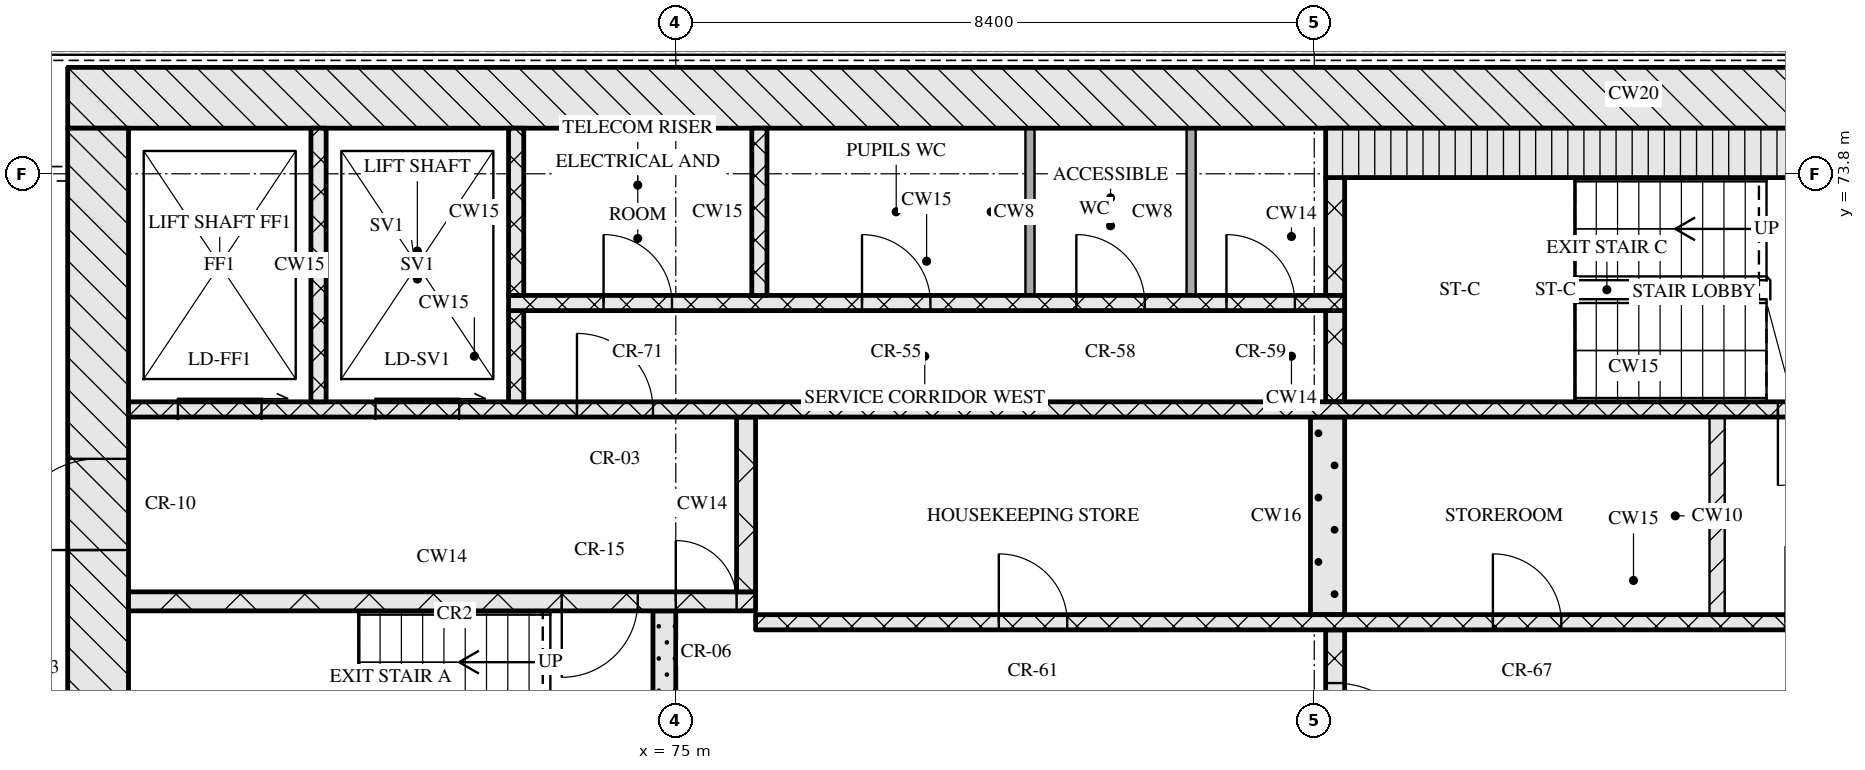
"""IFC4 building model, lengths in metres.
Left out: names, types, materials, properties, quantities, classifications, styles, units other than length and angle.
Written with IfcOpenShell. Run it as: python <this file> out.ifc"""

import sys

from ifc_helpers import new_model, si_unit, direction, frame, frame_2d, origin, place, context, subcontext, project, spatial, rectangle, extrude, element, fill, save


model = new_model("IFC4")
c1 = context("Model", 3, precision=1e-05, world=origin(), true_north=direction((0.0, 1.0)))
c2 = subcontext(c1, "Body", "Model", "MODEL_VIEW")
j1 = project(units=[si_unit("LENGTHUNIT", "METRE"), si_unit("PLANEANGLEUNIT", "RADIAN")], contexts=[c1])
p1 = place(None, origin())
s1 = spatial("IfcSite", under=j1, at=p1, CompositionType="ELEMENT")
p2 = place(p1, origin())
s2 = spatial("IfcBuilding", under=s1, at=p2, CompositionType="ELEMENT")
p3 = place(p2, frame((0.0, 0.0, 161.85)))
s3 = spatial("IfcBuildingStorey", under=s2, at=p3, CompositionType="ELEMENT", Elevation=161.85)
p4 = place(p3, frame((67.0, 74.8, 0.0), z_axis=(0.0, 0.0, 1.0), x_axis=(1.0, 0.0, 0.0)))
e1 = element("IfcWall", 1, at=p4, inside=s3, PredefinedType="SOLIDWALL", context=c2, shape_type="SweptSolid", body=[
    extrude(rectangle(XDim=41.2, YDim=0.8, at=frame_2d((20.6, 0.0))), origin(), (0.0, 0.0, 1.0), 3.32),
])
p5 = place(p3, frame((67.4, 62.4, 0.0), z_axis=(0.0, 0.0, 1.0), x_axis=(0.0, 1.0, 0.0)))
e2 = element("IfcWall", 2, at=p5, inside=s3, PredefinedType="SOLIDWALL", context=c2, shape_type="SweptSolid", body=[
    extrude(rectangle(XDim=12.0, YDim=0.8, at=frame_2d((6.0, 0.0))), origin(), (0.0, 0.0, 1.0), 3.32),
])
p6 = place(p5, frame((6.45, 0.0, 0.0)))
e3 = element("IfcOpeningElement", 3, at=p6, cuts=e2, PredefinedType="OPENING", context=c2, shape_type="SweptSolid", body=[
    extrude(rectangle(XDim=1.2, YDim=2.1, at=frame_2d((0.6, 1.05))), frame((0.0, 0.41, 0.0), z_axis=(0.0, -1.0, 0.0), x_axis=(1.0, 0.0, 0.0)), (0.0, 0.0, 1.0), 0.82),
])
p7 = place(p3, frame((74.85, 65.2, 0.0), z_axis=(0.0, 0.0, 1.0), x_axis=(0.0, 1.0, 0.0)))
e4 = element("IfcWall", 4, at=p7, inside=s3, PredefinedType="SOLIDWALL", context=c2, shape_type="SweptSolid", body=[
    extrude(rectangle(XDim=2.85, YDim=0.3, at=frame_2d((1.425, 0.0))), origin(), (0.0, 0.0, 1.0), 3.32),
])
p8 = place(p3, frame((83.675, 65.2, 0.0), z_axis=(0.0, 0.0, 1.0), x_axis=(0.0, 1.0, 0.0)))
e5 = element("IfcWall", 5, at=p8, inside=s3, PredefinedType="SOLIDWALL", context=c2, shape_type="SweptSolid", body=[
    extrude(rectangle(XDim=2.6, YDim=0.25, at=frame_2d((1.3, 0.0))), origin(), (0.0, 0.0, 1.0), 3.32),
])
p9 = place(p8, frame((0.7, 0.0, 0.0)))
e6 = element("IfcOpeningElement", 6, at=p9, cuts=e5, PredefinedType="OPENING", context=c2, shape_type="SweptSolid", body=[
    extrude(rectangle(XDim=1.2, YDim=2.1, at=frame_2d((0.6, 1.05))), frame((0.0, 0.135, 0.0), z_axis=(0.0, -1.0, 0.0), x_axis=(1.0, 0.0, 0.0)), (0.0, 0.0, 1.0), 0.27),
])
p10 = place(p3, frame((76.05, 67.9, 0.0), z_axis=(0.0, 0.0, 1.0), x_axis=(1.0, 0.0, 0.0)))
e7 = element("IfcWall", 7, at=p10, inside=s3, PredefinedType="SOLIDWALL", context=c2, shape_type="SweptSolid", body=[
    extrude(rectangle(XDim=23.1, YDim=0.2, at=frame_2d((11.55, 0.0))), origin(), (0.0, 0.0, 1.0), 3.32),
])
p11 = place(p10, frame((3.2, 0.0, 0.0)))
e8 = element("IfcOpeningElement", 8, at=p11, cuts=e7, PredefinedType="OPENING", context=c2, shape_type="SweptSolid", body=[
    extrude(rectangle(XDim=0.9, YDim=2.1, at=frame_2d((0.45, 1.05))), frame((0.0, 0.11, 0.0), z_axis=(0.0, -1.0, 0.0), x_axis=(1.0, 0.0, 0.0)), (0.0, 0.0, 1.0), 0.22),
])
p12 = place(p10, frame((9.7, 0.0, 0.0)))
e9 = element("IfcOpeningElement", 9, at=p12, cuts=e7, PredefinedType="OPENING", context=c2, shape_type="SweptSolid", body=[
    extrude(rectangle(XDim=0.9, YDim=2.1, at=frame_2d((0.45, 1.05))), frame((0.0, 0.11, 0.0), z_axis=(0.0, -1.0, 0.0), x_axis=(1.0, 0.0, 0.0)), (0.0, 0.0, 1.0), 0.22),
])
p13 = place(p10, frame((13.55, 0.0, 0.0)))
e10 = element("IfcOpeningElement", 10, at=p13, cuts=e7, PredefinedType="OPENING", context=c2, shape_type="SweptSolid", body=[
    extrude(rectangle(XDim=1.0, YDim=2.1, at=frame_2d((0.5, 1.05))), frame((0.0, 0.11, 0.0), z_axis=(0.0, -1.0, 0.0), x_axis=(1.0, 0.0, 0.0)), (0.0, 0.0, 1.0), 0.22),
])
p14 = place(p10, frame((16.2, 0.0, 0.0)))
e11 = element("IfcOpeningElement", 11, at=p14, cuts=e7, PredefinedType="OPENING", context=c2, shape_type="SweptSolid", body=[
    extrude(rectangle(XDim=1.1, YDim=2.1, at=frame_2d((0.55, 1.05))), frame((0.0, 0.11, 0.0), z_axis=(0.0, -1.0, 0.0), x_axis=(1.0, 0.0, 0.0)), (0.0, 0.0, 1.0), 0.22),
])
p15 = place(p10, frame((18.7, 0.0, 0.0)))
e12 = element("IfcOpeningElement", 12, at=p15, cuts=e7, PredefinedType="OPENING", context=c2, shape_type="SweptSolid", body=[
    extrude(rectangle(XDim=1.1, YDim=2.1, at=frame_2d((0.55, 1.05))), frame((0.0, 0.11, 0.0), z_axis=(0.0, -1.0, 0.0), x_axis=(1.0, 0.0, 0.0)), (0.0, 0.0, 1.0), 0.22),
])
p16 = place(p10, frame((21.2, 0.0, 0.0)))
e13 = element("IfcOpeningElement", 13, at=p16, cuts=e7, PredefinedType="OPENING", context=c2, shape_type="SweptSolid", body=[
    extrude(rectangle(XDim=1.1, YDim=2.1, at=frame_2d((0.55, 1.05))), frame((0.0, 0.11, 0.0), z_axis=(0.0, -1.0, 0.0), x_axis=(1.0, 0.0, 0.0)), (0.0, 0.0, 1.0), 0.22),
])
p17 = place(p3, frame((83.575, 68.0, 0.0), z_axis=(0.0, 0.0, 1.0), x_axis=(0.0, 1.0, 0.0)))
e14 = element("IfcWall", 14, at=p17, inside=s3, PredefinedType="SOLIDWALL", context=c2, shape_type="SweptSolid", body=[
    extrude(rectangle(XDim=2.6, YDim=0.45, at=frame_2d((1.3, 0.0))), origin(), (0.0, 0.0, 1.0), 3.32),
])
p18 = place(p3, frame((88.7, 68.0, 0.0), z_axis=(0.0, 0.0, 1.0), x_axis=(0.0, 1.0, 0.0)))
e15 = element("IfcWall", 15, at=p18, inside=s3, PredefinedType="PARTITIONING", context=c2, shape_type="SweptSolid", body=[
    extrude(rectangle(XDim=2.6, YDim=0.2, at=frame_2d((1.3, 0.0))), origin(), (0.0, 0.0, 1.0), 3.32),
])
p19 = place(p3, frame((67.8, 68.175, 0.0), z_axis=(0.0, 0.0, 1.0), x_axis=(1.0, 0.0, 0.0)))
e16 = element("IfcWall", 16, at=p19, inside=s3, PredefinedType="SOLIDWALL", context=c2, shape_type="SweptSolid", body=[
    extrude(rectangle(XDim=8.25, YDim=0.25, at=frame_2d((4.125, 0.0))), origin(), (0.0, 0.0, 1.0), 3.32),
])
p20 = place(p19, frame((5.7, 0.0, 0.0)))
e17 = element("IfcOpeningElement", 17, at=p20, cuts=e16, PredefinedType="OPENING", context=c2, shape_type="SweptSolid", body=[
    extrude(rectangle(XDim=1.0, YDim=2.1, at=frame_2d((0.5, 1.05))), frame((0.0, 0.135, 0.0), z_axis=(0.0, -1.0, 0.0), x_axis=(1.0, 0.0, 0.0)), (0.0, 0.0, 1.0), 0.27),
])
p21 = place(p19, frame((7.2, 0.0, 0.0)))
e18 = element("IfcOpeningElement", 18, at=p21, cuts=e16, PredefinedType="OPENING", context=c2, shape_type="SweptSolid", body=[
    extrude(rectangle(XDim=0.8, YDim=2.1, at=frame_2d((0.4, 1.05))), frame((0.0, 0.135, 0.0), z_axis=(0.0, -1.0, 0.0), x_axis=(1.0, 0.0, 0.0)), (0.0, 0.0, 1.0), 0.27),
])
p22 = place(p3, frame((75.925, 68.3, 0.0), z_axis=(0.0, 0.0, 1.0), x_axis=(0.0, 1.0, 0.0)))
e19 = element("IfcWall", 19, at=p22, inside=s3, PredefinedType="SOLIDWALL", context=c2, shape_type="SweptSolid", body=[
    extrude(rectangle(XDim=2.3, YDim=0.25, at=frame_2d((1.15, 0.0))), origin(), (0.0, 0.0, 1.0), 3.32),
])
p23 = place(p3, frame((67.8, 70.7, 0.0), z_axis=(0.0, 0.0, 1.0), x_axis=(1.0, 0.0, 0.0)))
e20 = element("IfcWall", 20, at=p23, inside=s3, PredefinedType="SOLIDWALL", context=c2, shape_type="SweptSolid", body=[
    extrude(rectangle(XDim=39.6, YDim=0.2, at=frame_2d((19.8, 0.0))), origin(), (0.0, 0.0, 1.0), 3.32),
])
p24 = place(p23, frame((0.65, 0.0, 0.0)))
e21 = element("IfcOpeningElement", 21, at=p24, cuts=e20, PredefinedType="OPENING", context=c2, shape_type="SweptSolid", body=[
    extrude(rectangle(XDim=1.1, YDim=2.1, at=frame_2d((0.55, 1.05))), frame((0.0, 0.11, 0.0), z_axis=(0.0, -1.0, 0.0), x_axis=(1.0, 0.0, 0.0)), (0.0, 0.0, 1.0), 0.22),
])
p25 = place(p23, frame((3.25, 0.0, 0.0)))
e22 = element("IfcOpeningElement", 22, at=p25, cuts=e20, PredefinedType="OPENING", context=c2, shape_type="SweptSolid", body=[
    extrude(rectangle(XDim=1.1, YDim=2.1, at=frame_2d((0.55, 1.05))), frame((0.0, 0.11, 0.0), z_axis=(0.0, -1.0, 0.0), x_axis=(1.0, 0.0, 0.0)), (0.0, 0.0, 1.0), 0.22),
])
p26 = place(p23, frame((5.9, 0.0, 0.0)))
e23 = element("IfcOpeningElement", 23, at=p26, cuts=e20, PredefinedType="OPENING", context=c2, shape_type="SweptSolid", body=[
    extrude(rectangle(XDim=1.0, YDim=2.1, at=frame_2d((0.5, 1.05))), frame((0.0, 0.11, 0.0), z_axis=(0.0, -1.0, 0.0), x_axis=(1.0, 0.0, 0.0)), (0.0, 0.0, 1.0), 0.22),
])
p27 = place(p23, frame((21.7, 0.0, 0.0)))
e24 = element("IfcOpeningElement", 24, at=p27, cuts=e20, PredefinedType="OPENING", context=c2, shape_type="SweptSolid", body=[
    extrude(rectangle(XDim=1.0, YDim=2.1, at=frame_2d((0.5, 1.05))), frame((0.0, 0.11, 0.0), z_axis=(0.0, -1.0, 0.0), x_axis=(1.0, 0.0, 0.0)), (0.0, 0.0, 1.0), 0.22),
])
p28 = place(p23, frame((32.7, 0.0, 0.0)))
e25 = element("IfcOpeningElement", 25, at=p28, cuts=e20, PredefinedType="OPENING", context=c2, shape_type="SweptSolid", body=[
    extrude(rectangle(XDim=1.0, YDim=2.1, at=frame_2d((0.5, 1.05))), frame((0.0, 0.11, 0.0), z_axis=(0.0, -1.0, 0.0), x_axis=(1.0, 0.0, 0.0)), (0.0, 0.0, 1.0), 0.22),
])
p29 = place(p23, frame((35.25, 0.0, 0.0)))
e26 = element("IfcOpeningElement", 26, at=p29, cuts=e20, PredefinedType="OPENING", context=c2, shape_type="SweptSolid", body=[
    extrude(rectangle(XDim=1.1, YDim=2.1, at=frame_2d((0.55, 1.05))), frame((0.0, 0.11, 0.0), z_axis=(0.0, -1.0, 0.0), x_axis=(1.0, 0.0, 0.0)), (0.0, 0.0, 1.0), 0.22),
])
p30 = place(p23, frame((37.85, 0.0, 0.0)))
e27 = element("IfcOpeningElement", 27, at=p30, cuts=e20, PredefinedType="OPENING", context=c2, shape_type="SweptSolid", body=[
    extrude(rectangle(XDim=1.1, YDim=2.1, at=frame_2d((0.55, 1.05))), frame((0.0, 0.11, 0.0), z_axis=(0.0, -1.0, 0.0), x_axis=(1.0, 0.0, 0.0)), (0.0, 0.0, 1.0), 0.22),
])
p31 = place(p3, frame((70.3, 70.8, 0.0), z_axis=(0.0, 0.0, 1.0), x_axis=(0.0, 1.0, 0.0)))
e28 = element("IfcWall", 28, at=p31, inside=s3, PredefinedType="SOLIDWALL", context=c2, shape_type="SweptSolid", body=[
    extrude(rectangle(XDim=3.6, YDim=0.2, at=frame_2d((1.8, 0.0))), origin(), (0.0, 0.0, 1.0), 3.32),
])
p32 = place(p3, frame((72.9, 70.8, 0.0), z_axis=(0.0, 0.0, 1.0), x_axis=(0.0, 1.0, 0.0)))
e29 = element("IfcWall", 29, at=p32, inside=s3, PredefinedType="SOLIDWALL", context=c2, shape_type="SweptSolid", body=[
    extrude(rectangle(XDim=1.2, YDim=0.2, at=frame_2d((0.6, 0.0))), origin(), (0.0, 0.0, 1.0), 3.32),
])
p33 = place(p3, frame((83.675, 70.8, 0.0), z_axis=(0.0, 0.0, 1.0), x_axis=(0.0, 1.0, 0.0)))
e30 = element("IfcWall", 30, at=p33, inside=s3, PredefinedType="SOLIDWALL", context=c2, shape_type="SweptSolid", body=[
    extrude(rectangle(XDim=1.2, YDim=0.25, at=frame_2d((0.6, 0.0))), origin(), (0.0, 0.0, 1.0), 3.32),
])
p34 = place(p3, frame((72.8, 72.1, 0.0), z_axis=(0.0, 0.0, 1.0), x_axis=(1.0, 0.0, 0.0)))
e31 = element("IfcWall", 31, at=p34, inside=s3, PredefinedType="SOLIDWALL", context=c2, shape_type="SweptSolid", body=[
    extrude(rectangle(XDim=11.0, YDim=0.2, at=frame_2d((5.5, 0.0))), origin(), (0.0, 0.0, 1.0), 3.32),
])
p35 = place(p34, frame((1.25, 0.0, 0.0)))
e32 = element("IfcOpeningElement", 32, at=p35, cuts=e31, PredefinedType="OPENING", context=c2, shape_type="SweptSolid", body=[
    extrude(rectangle(XDim=0.9, YDim=2.1, at=frame_2d((0.45, 1.05))), frame((0.0, 0.11, 0.0), z_axis=(0.0, -1.0, 0.0), x_axis=(1.0, 0.0, 0.0)), (0.0, 0.0, 1.0), 0.22),
])
p36 = place(p34, frame((4.65, 0.0, 0.0)))
e33 = element("IfcOpeningElement", 33, at=p36, cuts=e31, PredefinedType="OPENING", context=c2, shape_type="SweptSolid", body=[
    extrude(rectangle(XDim=0.9, YDim=2.1, at=frame_2d((0.45, 1.05))), frame((0.0, 0.11, 0.0), z_axis=(0.0, -1.0, 0.0), x_axis=(1.0, 0.0, 0.0)), (0.0, 0.0, 1.0), 0.22),
])
p37 = place(p34, frame((7.47, 0.0, 0.0)))
e34 = element("IfcOpeningElement", 34, at=p37, cuts=e31, PredefinedType="OPENING", context=c2, shape_type="SweptSolid", body=[
    extrude(rectangle(XDim=0.9, YDim=2.1, at=frame_2d((0.45, 1.05))), frame((0.0, 0.11, 0.0), z_axis=(0.0, -1.0, 0.0), x_axis=(1.0, 0.0, 0.0)), (0.0, 0.0, 1.0), 0.22),
])
p38 = place(p34, frame((9.445, 0.0, 0.0)))
e35 = element("IfcOpeningElement", 35, at=p38, cuts=e31, PredefinedType="OPENING", context=c2, shape_type="SweptSolid", body=[
    extrude(rectangle(XDim=0.9, YDim=2.1, at=frame_2d((0.45, 1.05))), frame((0.0, 0.11, 0.0), z_axis=(0.0, -1.0, 0.0), x_axis=(1.0, 0.0, 0.0)), (0.0, 0.0, 1.0), 0.22),
])
for number, where, z_axis, x_axis in (
    (36, (72.9, 72.2, 0.0), (0.0, 0.0, 1.0), (0.0, 1.0, 0.0)),
    (37, (76.1, 72.2, 0.0), (0.0, 0.0, 1.0), (0.0, 1.0, 0.0)),
):
    element("IfcWall", number, at=place(p3, frame(where, z_axis=z_axis, x_axis=x_axis)), inside=s3, PredefinedType="SOLIDWALL", context=c2, shape_type="SweptSolid", body=[
        extrude(rectangle(XDim=2.2, YDim=0.2, at=frame_2d((1.1, 0.0))), origin(), (0.0, 0.0, 1.0), 3.32),
    ])
for number, where, z_axis, x_axis in (
    (38, (79.66, 72.2, 0.0), (0.0, 0.0, 1.0), (0.0, 1.0, 0.0)),
    (39, (81.78, 72.2, 0.0), (0.0, 0.0, 1.0), (0.0, 1.0, 0.0)),
):
    element("IfcWall", number, at=place(p3, frame(where, z_axis=z_axis, x_axis=x_axis)), inside=s3, PredefinedType="PARTITIONING", context=c2, shape_type="SweptSolid", body=[
        extrude(rectangle(XDim=2.2, YDim=0.12, at=frame_2d((1.1, 0.0))), origin(), (0.0, 0.0, 1.0), 3.32),
    ])
p39 = place(p3, frame((83.675, 72.2, 0.0), z_axis=(0.0, 0.0, 1.0), x_axis=(0.0, 1.0, 0.0)))
e40 = element("IfcWall", 40, at=p39, inside=s3, PredefinedType="SOLIDWALL", context=c2, shape_type="SweptSolid", body=[
    extrude(rectangle(XDim=1.55, YDim=0.25, at=frame_2d((0.775, 0.0))), origin(), (0.0, 0.0, 1.0), 3.32),
])
p40 = place(p3, frame((83.55, 74.075, 0.0), z_axis=(0.0, 0.0, 1.0), x_axis=(1.0, 0.0, 0.0)))
e41 = element("IfcWall", 41, at=p40, inside=s3, PredefinedType="SOLIDWALL", context=c2, shape_type="SweptSolid", body=[
    extrude(rectangle(XDim=8.1, YDim=0.65, at=frame_2d((4.05, 0.0))), origin(), (0.0, 0.0, 1.0), 3.32),
])
p41 = place(p9, origin())
e42 = element("IfcDoor", 42, at=p41, inside=s3, OperationType="SINGLE_SWING_RIGHT", PredefinedType="DOOR", context=c2, shape_type="SweptSolid", body=[
    extrude(rectangle(XDim=1.2, YDim=2.1, at=frame_2d((0.6, 1.05))), frame((0.0, 0.025, 0.0), z_axis=(0.0, -1.0, 0.0), x_axis=(1.0, 0.0, 0.0)), (0.0, 0.0, 1.0), 0.05),
])
fill(e6, e42)
p42 = place(p11, origin())
e43 = element("IfcDoor", 43, at=p42, inside=s3, OperationType="SINGLE_SWING_LEFT", PredefinedType="DOOR", context=c2, shape_type="SweptSolid", body=[
    extrude(rectangle(XDim=0.9, YDim=2.1, at=frame_2d((0.45, 1.05))), frame((0.0, 0.025, 0.0), z_axis=(0.0, -1.0, 0.0), x_axis=(1.0, 0.0, 0.0)), (0.0, 0.0, 1.0), 0.05),
])
fill(e8, e43)
p43 = place(p12, origin())
e44 = element("IfcDoor", 44, at=p43, inside=s3, OperationType="SINGLE_SWING_LEFT", PredefinedType="DOOR", context=c2, shape_type="SweptSolid", body=[
    extrude(rectangle(XDim=0.9, YDim=2.1, at=frame_2d((0.45, 1.05))), frame((0.0, 0.025, 0.0), z_axis=(0.0, -1.0, 0.0), x_axis=(1.0, 0.0, 0.0)), (0.0, 0.0, 1.0), 0.05),
])
fill(e9, e44)
p44 = place(p20, origin())
e45 = element("IfcDoor", 45, at=p44, inside=s3, OperationType="SINGLE_SWING_RIGHT", PredefinedType="DOOR", context=c2, shape_type="SweptSolid", body=[
    extrude(rectangle(XDim=1.0, YDim=2.1, at=frame_2d((0.5, 1.05))), frame((0.0, 0.025, 0.0), z_axis=(0.0, -1.0, 0.0), x_axis=(1.0, 0.0, 0.0)), (0.0, 0.0, 1.0), 0.05),
])
fill(e17, e45)
p45 = place(p21, origin())
e46 = element("IfcDoor", 46, at=p45, inside=s3, OperationType="SINGLE_SWING_LEFT", PredefinedType="DOOR", context=c2, shape_type="SweptSolid", body=[
    extrude(rectangle(XDim=0.8, YDim=2.1, at=frame_2d((0.4, 1.05))), frame((0.0, 0.025, 0.0), z_axis=(0.0, -1.0, 0.0), x_axis=(1.0, 0.0, 0.0)), (0.0, 0.0, 1.0), 0.05),
])
fill(e18, e46)
p46 = place(p6, origin())
e47 = element("IfcDoor", 47, at=p46, inside=s3, OperationType="SINGLE_SWING_LEFT", PredefinedType="DOOR", context=c2, shape_type="SweptSolid", body=[
    extrude(rectangle(XDim=1.2, YDim=2.1, at=frame_2d((0.6, 1.05))), frame((0.0, 0.025, 0.0), z_axis=(0.0, -1.0, 0.0), x_axis=(1.0, 0.0, 0.0)), (0.0, 0.0, 1.0), 0.05),
])
fill(e3, e47)
p47 = place(p24, origin())
e48 = element("IfcDoor", 48, at=p47, inside=s3, OperationType="SLIDING_TO_RIGHT", PredefinedType="DOOR", context=c2, shape_type="SweptSolid", body=[
    extrude(rectangle(XDim=1.1, YDim=2.1, at=frame_2d((0.55, 1.05))), frame((0.0, 0.025, 0.0), z_axis=(0.0, -1.0, 0.0), x_axis=(1.0, 0.0, 0.0)), (0.0, 0.0, 1.0), 0.05),
])
fill(e21, e48)
p48 = place(p25, origin())
e49 = element("IfcDoor", 49, at=p48, inside=s3, OperationType="SLIDING_TO_RIGHT", PredefinedType="DOOR", context=c2, shape_type="SweptSolid", body=[
    extrude(rectangle(XDim=1.1, YDim=2.1, at=frame_2d((0.55, 1.05))), frame((0.0, 0.025, 0.0), z_axis=(0.0, -1.0, 0.0), x_axis=(1.0, 0.0, 0.0)), (0.0, 0.0, 1.0), 0.05),
])
fill(e22, e49)
p49 = place(p26, origin())
e50 = element("IfcDoor", 50, at=p49, inside=s3, OperationType="SINGLE_SWING_LEFT", PredefinedType="DOOR", context=c2, shape_type="SweptSolid", body=[
    extrude(rectangle(XDim=1.0, YDim=2.1, at=frame_2d((0.5, 1.05))), frame((0.0, 0.025, 0.0), z_axis=(0.0, -1.0, 0.0), x_axis=(1.0, 0.0, 0.0)), (0.0, 0.0, 1.0), 0.05),
])
fill(e23, e50)
p50 = place(p27, origin())
e51 = element("IfcDoor", 51, at=p50, inside=s3, OperationType="SINGLE_SWING_RIGHT", PredefinedType="DOOR", context=c2, shape_type="SweptSolid", body=[
    extrude(rectangle(XDim=1.0, YDim=2.1, at=frame_2d((0.5, 1.05))), frame((0.0, 0.025, 0.0), z_axis=(0.0, -1.0, 0.0), x_axis=(1.0, 0.0, 0.0)), (0.0, 0.0, 1.0), 0.05),
])
fill(e24, e51)
p51 = place(p35, origin())
e52 = element("IfcDoor", 52, at=p51, inside=s3, OperationType="SINGLE_SWING_LEFT", PredefinedType="DOOR", context=c2, shape_type="SweptSolid", body=[
    extrude(rectangle(XDim=0.9, YDim=2.1, at=frame_2d((0.45, 1.05))), frame((0.0, 0.025, 0.0), z_axis=(0.0, -1.0, 0.0), x_axis=(1.0, 0.0, 0.0)), (0.0, 0.0, 1.0), 0.05),
])
fill(e32, e52)
p52 = place(p36, origin())
e53 = element("IfcDoor", 53, at=p52, inside=s3, OperationType="SINGLE_SWING_LEFT", PredefinedType="DOOR", context=c2, shape_type="SweptSolid", body=[
    extrude(rectangle(XDim=0.9, YDim=2.1, at=frame_2d((0.45, 1.05))), frame((0.0, 0.025, 0.0), z_axis=(0.0, -1.0, 0.0), x_axis=(1.0, 0.0, 0.0)), (0.0, 0.0, 1.0), 0.05),
])
fill(e33, e53)
p53 = place(p37, origin())
e54 = element("IfcDoor", 54, at=p53, inside=s3, OperationType="SINGLE_SWING_LEFT", PredefinedType="DOOR", context=c2, shape_type="SweptSolid", body=[
    extrude(rectangle(XDim=0.9, YDim=2.1, at=frame_2d((0.45, 1.05))), frame((0.0, 0.025, 0.0), z_axis=(0.0, -1.0, 0.0), x_axis=(1.0, 0.0, 0.0)), (0.0, 0.0, 1.0), 0.05),
])
fill(e34, e54)
p54 = place(p38, origin())
e55 = element("IfcDoor", 55, at=p54, inside=s3, OperationType="SINGLE_SWING_LEFT", PredefinedType="DOOR", context=c2, shape_type="SweptSolid", body=[
    extrude(rectangle(XDim=0.9, YDim=2.1, at=frame_2d((0.45, 1.05))), frame((0.0, 0.025, 0.0), z_axis=(0.0, -1.0, 0.0), x_axis=(1.0, 0.0, 0.0)), (0.0, 0.0, 1.0), 0.05),
])
fill(e35, e55)
save(model, sys.argv[1])
